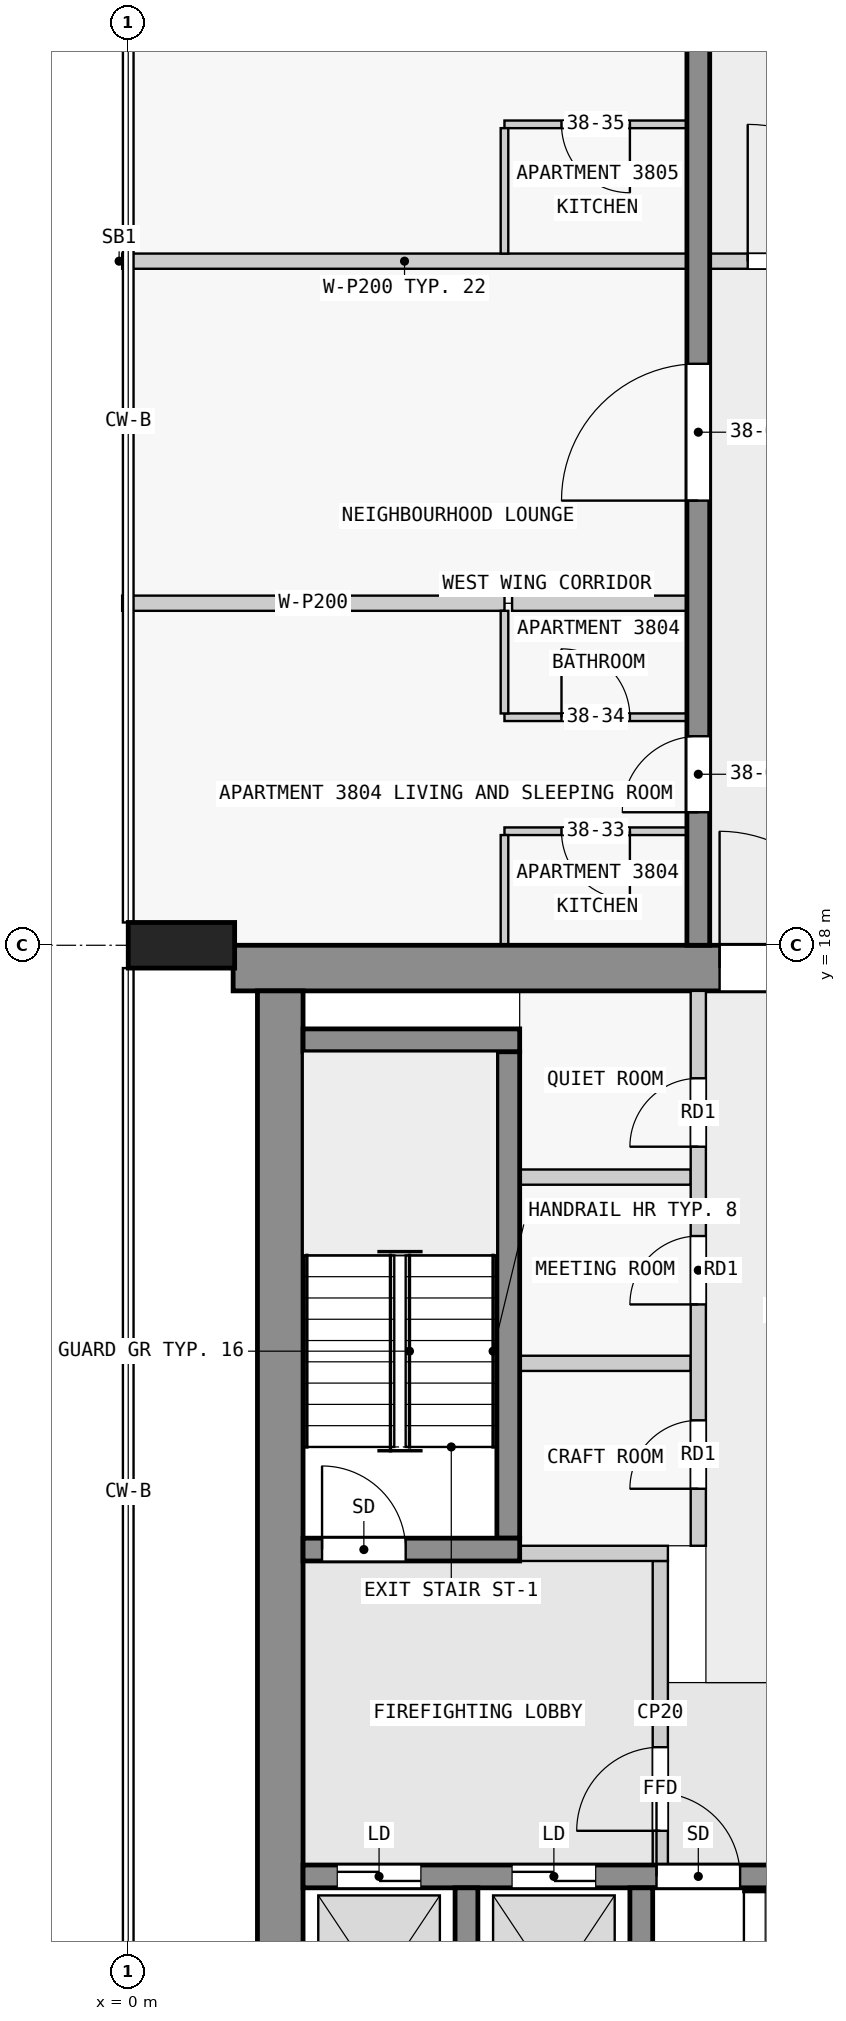
"""IFC4 building model, lengths in metres.
Left out: names, types, materials, properties, quantities, classifications, styles, units other than length and angle.
Written with IfcOpenShell. Run it as: python <this file> out.ifc"""

import sys

from ifc_helpers import new_model, si_unit, direction, frame, frame_2d, origin, origin_2d, place, context, subcontext, project, spatial, rectangle, extrude, element, fill, save


model = new_model("IFC4")
c1 = context("Model", 3, precision=1e-05, world=origin(), true_north=direction((0.0, 1.0)))
c2 = subcontext(c1, "Body", "Model", "MODEL_VIEW")
j1 = project(units=[si_unit("LENGTHUNIT", "METRE"), si_unit("PLANEANGLEUNIT", "RADIAN")], contexts=[c1])
p1 = place(None, origin())
s1 = spatial("IfcSite", under=j1, at=p1, CompositionType="ELEMENT")
p2 = place(p1, origin())
s2 = spatial("IfcBuilding", under=s1, at=p2, CompositionType="ELEMENT")
p3 = place(p2, frame((0.0, 0.0, 149.9)))
s3 = spatial("IfcBuildingStorey", under=s2, at=p3, CompositionType="ELEMENT", Elevation=149.9)
p4 = place(p3, frame((0.7, 18.0, 0.0), z_axis=(0.0, 0.0, 1.0), x_axis=(0.0, 1.0, 0.0)))
e1 = element("IfcColumn", 1, at=p4, inside=s3, PredefinedType="COLUMN", context=c2, shape_type="SweptSolid", body=[
    extrude(rectangle(XDim=0.6, YDim=1.4, at=origin_2d()), origin(), (0.0, 0.0, 1.0), 3.5),
])
p5 = place(p3, frame((1.38, 17.7, 0.0), z_axis=(0.0, 0.0, 1.0), x_axis=(1.0, 0.0, 0.0)))
e2 = element("IfcWall", 2, at=p5, inside=s3, PredefinedType="SHEAR", context=c2, shape_type="SweptSolid", body=[
    extrude(rectangle(XDim=21.12, YDim=0.6, at=frame_2d((10.56, 0.0))), origin(), (0.0, 0.0, 1.0), 3.25),
])
p6 = place(p5, frame((6.4, 0.0, 0.0)))
e3 = element("IfcOpeningElement", 3, at=p6, cuts=e2, PredefinedType="OPENING", context=c2, shape_type="SweptSolid", body=[
    extrude(rectangle(XDim=1.8, YDim=2.1, at=frame_2d((0.9, 1.05))), frame((0.0, 0.31, 0.0), z_axis=(0.0, -1.0, 0.0), x_axis=(1.0, 0.0, 0.0)), (0.0, 0.0, 1.0), 0.62),
])
p7 = place(p3, frame((2.0, 2.5, 0.0), z_axis=(0.0, 0.0, 1.0), x_axis=(0.0, 1.0, 0.0)))
e4 = element("IfcWall", 4, at=p7, inside=s3, PredefinedType="SHEAR", context=c2, shape_type="SweptSolid", body=[
    extrude(rectangle(XDim=14.9, YDim=0.6, at=frame_2d((7.45, 0.0))), origin(), (0.0, 0.0, 1.0), 3.25),
])
for number, where, z_axis, x_axis in (
    (5, (4.45, 2.8, 0.0), (0.0, 0.0, 1.0), (0.0, 1.0, 0.0)),
    (6, (6.75, 2.8, 0.0), (0.0, 0.0, 1.0), (0.0, 1.0, 0.0)),
):
    element("IfcWall", number, at=place(p3, frame(where, z_axis=z_axis, x_axis=x_axis)), inside=s3, PredefinedType="SHEAR", context=c2, shape_type="SweptSolid", body=[
        extrude(rectangle(XDim=2.8, YDim=0.3, at=frame_2d((1.4, 0.0))), origin(), (0.0, 0.0, 1.0), 3.25),
    ])
p8 = place(p3, frame((2.3, 5.75, 0.0), z_axis=(0.0, 0.0, 1.0), x_axis=(1.0, 0.0, 0.0)))
e7 = element("IfcWall", 7, at=p8, inside=s3, PredefinedType="SHEAR", context=c2, shape_type="SweptSolid", body=[
    extrude(rectangle(XDim=18.8, YDim=0.3, at=frame_2d((9.4, 0.0))), origin(), (0.0, 0.0, 1.0), 3.25),
])
p9 = place(p8, frame((4.65, 0.0, 0.0)))
e8 = element("IfcOpeningElement", 8, at=p9, cuts=e7, PredefinedType="OPENING", context=c2, shape_type="SweptSolid", body=[
    extrude(rectangle(XDim=1.1, YDim=2.1, at=frame_2d((0.55, 1.05))), frame((0.0, 0.16, 0.0), z_axis=(0.0, -1.0, 0.0), x_axis=(1.0, 0.0, 0.0)), (0.0, 0.0, 1.0), 0.32),
])
p10 = place(p8, frame((0.45, 0.0, 0.0)))
e9 = element("IfcOpeningElement", 9, at=p10, cuts=e7, PredefinedType="OPENING", context=c2, shape_type="SweptSolid", body=[
    extrude(rectangle(XDim=1.1, YDim=2.1, at=frame_2d((0.55, 1.05))), frame((0.0, 0.16, 0.0), z_axis=(0.0, -1.0, 0.0), x_axis=(1.0, 0.0, 0.0)), (0.0, 0.0, 1.0), 0.32),
])
p11 = place(p8, frame((2.75, 0.0, 0.0)))
e10 = element("IfcOpeningElement", 10, at=p11, cuts=e7, PredefinedType="OPENING", context=c2, shape_type="SweptSolid", body=[
    extrude(rectangle(XDim=1.1, YDim=2.1, at=frame_2d((0.55, 1.05))), frame((0.0, 0.16, 0.0), z_axis=(0.0, -1.0, 0.0), x_axis=(1.0, 0.0, 0.0)), (0.0, 0.0, 1.0), 0.32),
])
p12 = place(p8, frame((14.45, 0.0, 0.0)))
e11 = element("IfcOpeningElement", 11, at=p12, cuts=e7, PredefinedType="OPENING", context=c2, shape_type="SweptSolid", body=[
    extrude(rectangle(XDim=0.9, YDim=2.1, at=frame_2d((0.45, 1.05))), frame((0.0, 0.16, 0.0), z_axis=(0.0, -1.0, 0.0), x_axis=(1.0, 0.0, 0.0)), (0.0, 0.0, 1.0), 0.32),
])
p13 = place(p3, frame((2.3, 10.05, 0.0), z_axis=(0.0, 0.0, 1.0), x_axis=(1.0, 0.0, 0.0)))
e12 = element("IfcWall", 12, at=p13, inside=s3, PredefinedType="SHEAR", context=c2, shape_type="SweptSolid", body=[
    extrude(rectangle(XDim=2.85, YDim=0.3, at=frame_2d((1.425, 0.0))), origin(), (0.0, 0.0, 1.0), 3.25),
])
p14 = place(p13, frame((0.25, 0.0, 0.0)))
e13 = element("IfcOpeningElement", 13, at=p14, cuts=e12, PredefinedType="OPENING", context=c2, shape_type="SweptSolid", body=[
    extrude(rectangle(XDim=1.1, YDim=2.1, at=frame_2d((0.55, 1.05))), frame((0.0, 0.16, 0.0), z_axis=(0.0, -1.0, 0.0), x_axis=(1.0, 0.0, 0.0)), (0.0, 0.0, 1.0), 0.32),
])
p15 = place(p3, frame((5.0, 10.2, 0.0), z_axis=(0.0, 0.0, 1.0), x_axis=(0.0, 1.0, 0.0)))
e14 = element("IfcWall", 14, at=p15, inside=s3, PredefinedType="SHEAR", context=c2, shape_type="SweptSolid", body=[
    extrude(rectangle(XDim=6.4, YDim=0.3, at=frame_2d((3.2, 0.0))), origin(), (0.0, 0.0, 1.0), 3.25),
])
p16 = place(p3, frame((2.3, 16.75, 0.0), z_axis=(0.0, 0.0, 1.0), x_axis=(1.0, 0.0, 0.0)))
e15 = element("IfcWall", 15, at=p16, inside=s3, PredefinedType="SHEAR", context=c2, shape_type="SweptSolid", body=[
    extrude(rectangle(XDim=2.85, YDim=0.3, at=frame_2d((1.425, 0.0))), origin(), (0.0, 0.0, 1.0), 3.25),
])
p17 = place(p3, frame((7.5, 18.0, 0.0), z_axis=(0.0, 0.0, 1.0), x_axis=(0.0, 1.0, 0.0)))
e16 = element("IfcWall", 16, at=p17, inside=s3, PredefinedType="SHEAR", context=c2, shape_type="SweptSolid", body=[
    extrude(rectangle(XDim=27.0, YDim=0.3, at=frame_2d((13.5, 0.0))), origin(), (0.0, 0.0, 1.0), 3.25),
])
p18 = place(p17, frame((1.75, 0.0, 0.0)))
e17 = element("IfcOpeningElement", 17, at=p18, cuts=e16, PredefinedType="OPENING", context=c2, shape_type="SweptSolid", body=[
    extrude(rectangle(XDim=1.0, YDim=2.1, at=frame_2d((0.5, 1.05))), frame((0.0, 0.16, 0.0), z_axis=(0.0, -1.0, 0.0), x_axis=(1.0, 0.0, 0.0)), (0.0, 0.0, 1.0), 0.32),
])
p19 = place(p17, frame((5.85, 0.0, 0.0)))
e18 = element("IfcOpeningElement", 18, at=p19, cuts=e16, PredefinedType="OPENING", context=c2, shape_type="SweptSolid", body=[
    extrude(rectangle(XDim=1.8, YDim=2.1, at=frame_2d((0.9, 1.05))), frame((0.0, 0.16, 0.0), z_axis=(0.0, -1.0, 0.0), x_axis=(1.0, 0.0, 0.0)), (0.0, 0.0, 1.0), 0.32),
])
p20 = place(p17, frame((13.05, 0.0, 0.0)))
e19 = element("IfcOpeningElement", 19, at=p20, cuts=e16, PredefinedType="OPENING", context=c2, shape_type="SweptSolid", body=[
    extrude(rectangle(XDim=1.0, YDim=2.1, at=frame_2d((0.5, 1.05))), frame((0.0, 0.16, 0.0), z_axis=(0.0, -1.0, 0.0), x_axis=(1.0, 0.0, 0.0)), (0.0, 0.0, 1.0), 0.32),
])
p21 = place(p17, frame((21.35, 0.0, 0.0)))
e20 = element("IfcOpeningElement", 20, at=p21, cuts=e16, PredefinedType="OPENING", context=c2, shape_type="SweptSolid", body=[
    extrude(rectangle(XDim=1.0, YDim=2.1, at=frame_2d((0.5, 1.05))), frame((0.0, 0.16, 0.0), z_axis=(0.0, -1.0, 0.0), x_axis=(1.0, 0.0, 0.0)), (0.0, 0.0, 1.0), 0.32),
])
p22 = place(p3, frame((7.0, 5.9, 0.0), z_axis=(0.0, 0.0, 1.0), x_axis=(0.0, 1.0, 0.0)))
e21 = element("IfcWall", 21, at=p22, inside=s3, PredefinedType="PARTITIONING", context=c2, shape_type="SweptSolid", body=[
    extrude(rectangle(XDim=4.0, YDim=0.2, at=frame_2d((2.0, 0.0))), origin(), (0.0, 0.0, 1.0), 3.25),
])
p23 = place(p22, frame((0.45, 0.0, 0.0)))
e22 = element("IfcOpeningElement", 22, at=p23, cuts=e21, PredefinedType="OPENING", context=c2, shape_type="SweptSolid", body=[
    extrude(rectangle(XDim=1.1, YDim=2.1, at=frame_2d((0.55, 1.05))), frame((0.0, 0.11, 0.0), z_axis=(0.0, -1.0, 0.0), x_axis=(1.0, 0.0, 0.0)), (0.0, 0.0, 1.0), 0.22),
])
p24 = place(p3, frame((5.15, 10.0, 0.0), z_axis=(0.0, 0.0, 1.0), x_axis=(1.0, 0.0, 0.0)))
e23 = element("IfcWall", 23, at=p24, inside=s3, PredefinedType="PARTITIONING", context=c2, shape_type="SweptSolid", body=[
    extrude(rectangle(XDim=1.95, YDim=0.2, at=frame_2d((0.975, 0.0))), origin(), (0.0, 0.0, 1.0), 3.25),
])
p25 = place(p3, frame((7.5, 10.1, 0.0), z_axis=(0.0, 0.0, 1.0), x_axis=(0.0, 1.0, 0.0)))
e24 = element("IfcWall", 24, at=p25, inside=s3, PredefinedType="PARTITIONING", context=c2, shape_type="SweptSolid", body=[
    extrude(rectangle(XDim=7.3, YDim=0.2, at=frame_2d((3.65, 0.0))), origin(), (0.0, 0.0, 1.0), 3.25),
])
p26 = place(p25, frame((0.75, 0.0, 0.0)))
e25 = element("IfcOpeningElement", 25, at=p26, cuts=e24, PredefinedType="OPENING", context=c2, shape_type="SweptSolid", body=[
    extrude(rectangle(XDim=0.9, YDim=2.1, at=frame_2d((0.45, 1.05))), frame((0.0, 0.11, 0.0), z_axis=(0.0, -1.0, 0.0), x_axis=(1.0, 0.0, 0.0)), (0.0, 0.0, 1.0), 0.22),
])
p27 = place(p25, frame((3.175, 0.0, 0.0)))
e26 = element("IfcOpeningElement", 26, at=p27, cuts=e24, PredefinedType="OPENING", context=c2, shape_type="SweptSolid", body=[
    extrude(rectangle(XDim=0.9, YDim=2.1, at=frame_2d((0.45, 1.05))), frame((0.0, 0.11, 0.0), z_axis=(0.0, -1.0, 0.0), x_axis=(1.0, 0.0, 0.0)), (0.0, 0.0, 1.0), 0.22),
])
p28 = place(p25, frame((5.25, 0.0, 0.0)))
e27 = element("IfcOpeningElement", 27, at=p28, cuts=e24, PredefinedType="OPENING", context=c2, shape_type="SweptSolid", body=[
    extrude(rectangle(XDim=0.9, YDim=2.1, at=frame_2d((0.45, 1.05))), frame((0.0, 0.11, 0.0), z_axis=(0.0, -1.0, 0.0), x_axis=(1.0, 0.0, 0.0)), (0.0, 0.0, 1.0), 0.22),
])
for number, where, z_axis, x_axis in (
    (28, (5.15, 12.5, 0.0), (0.0, 0.0, 1.0), (1.0, 0.0, 0.0)),
    (29, (5.15, 14.95, 0.0), (0.0, 0.0, 1.0), (1.0, 0.0, 0.0)),
):
    element("IfcWall", number, at=place(p3, frame(where, z_axis=z_axis, x_axis=x_axis)), inside=s3, PredefinedType="PARTITIONING", context=c2, shape_type="SweptSolid", body=[
        extrude(rectangle(XDim=2.25, YDim=0.2, at=frame_2d((1.125, 0.0))), origin(), (0.0, 0.0, 1.0), 3.25),
    ])
p29 = place(p3, frame((7.35, 19.5, 0.0), z_axis=(0.0, 0.0, 1.0), x_axis=(-1.0, 0.0, 0.0)))
e30 = element("IfcWall", 30, at=p29, inside=s3, PredefinedType="PARTITIONING", context=c2, shape_type="SweptSolid", body=[
    extrude(rectangle(XDim=2.4, YDim=0.1, at=frame_2d((1.2, 0.0))), origin(), (0.0, 0.0, 1.0), 3.25),
])
p30 = place(p29, frame((0.75, 0.0, 0.0)))
e31 = element("IfcOpeningElement", 31, at=p30, cuts=e30, PredefinedType="OPENING", context=c2, shape_type="SweptSolid", body=[
    extrude(rectangle(XDim=0.9, YDim=2.1, at=frame_2d((0.45, 1.05))), frame((0.0, 0.06, 0.0), z_axis=(0.0, -1.0, 0.0), x_axis=(1.0, 0.0, 0.0)), (0.0, 0.0, 1.0), 0.12),
])
p31 = place(p3, frame((4.95, 21.0, 0.0), z_axis=(0.0, 0.0, 1.0), x_axis=(1.0, 0.0, 0.0)))
e32 = element("IfcWall", 32, at=p31, inside=s3, PredefinedType="PARTITIONING", context=c2, shape_type="SweptSolid", body=[
    extrude(rectangle(XDim=2.4, YDim=0.1, at=frame_2d((1.2, 0.0))), origin(), (0.0, 0.0, 1.0), 3.25),
])
p32 = place(p31, frame((0.75, 0.0, 0.0)))
e33 = element("IfcOpeningElement", 33, at=p32, cuts=e32, PredefinedType="OPENING", context=c2, shape_type="SweptSolid", body=[
    extrude(rectangle(XDim=0.9, YDim=2.1, at=frame_2d((0.45, 1.05))), frame((0.0, 0.06, 0.0), z_axis=(0.0, -1.0, 0.0), x_axis=(1.0, 0.0, 0.0)), (0.0, 0.0, 1.0), 0.12),
])
p33 = place(p3, frame((7.35, 22.5, 0.0), z_axis=(0.0, 0.0, 1.0), x_axis=(-1.0, 0.0, 0.0)))
e34 = element("IfcWall", 34, at=p33, inside=s3, PredefinedType="PARTITIONING", context=c2, shape_type="SweptSolid", body=[
    extrude(rectangle(XDim=2.3, YDim=0.2, at=frame_2d((1.15, 0.0))), origin(), (0.0, 0.0, 1.0), 3.25),
])
p34 = place(p3, frame((-0.08, 22.5, 0.0), z_axis=(0.0, 0.0, 1.0), x_axis=(1.0, 0.0, 0.0)))
e35 = element("IfcWall", 35, at=p34, inside=s3, PredefinedType="PARTITIONING", context=c2, shape_type="SweptSolid", body=[
    extrude(rectangle(XDim=5.03, YDim=0.2, at=frame_2d((2.515, 0.0))), origin(), (0.0, 0.0, 1.0), 3.25),
])
p35 = place(p3, frame((7.35, 27.0, 0.0), z_axis=(0.0, 0.0, 1.0), x_axis=(-1.0, 0.0, 0.0)))
e36 = element("IfcWall", 36, at=p35, inside=s3, PredefinedType="PARTITIONING", context=c2, shape_type="SweptSolid", body=[
    extrude(rectangle(XDim=7.43, YDim=0.2, at=frame_2d((3.715, 0.0))), origin(), (0.0, 0.0, 1.0), 3.25),
])
p36 = place(p3, frame((7.35, 28.8, 0.0), z_axis=(0.0, 0.0, 1.0), x_axis=(-1.0, 0.0, 0.0)))
e37 = element("IfcWall", 37, at=p36, inside=s3, PredefinedType="PARTITIONING", context=c2, shape_type="SweptSolid", body=[
    extrude(rectangle(XDim=2.4, YDim=0.1, at=frame_2d((1.2, 0.0))), origin(), (0.0, 0.0, 1.0), 3.25),
])
p37 = place(p36, frame((0.75, 0.0, 0.0)))
e38 = element("IfcOpeningElement", 38, at=p37, cuts=e37, PredefinedType="OPENING", context=c2, shape_type="SweptSolid", body=[
    extrude(rectangle(XDim=0.9, YDim=2.1, at=frame_2d((0.45, 1.05))), frame((0.0, 0.06, 0.0), z_axis=(0.0, -1.0, 0.0), x_axis=(1.0, 0.0, 0.0)), (0.0, 0.0, 1.0), 0.12),
])
p38 = place(p3, frame((4.95, 19.45, 0.0), z_axis=(0.0, 0.0, 1.0), x_axis=(0.0, -1.0, 0.0)))
e39 = element("IfcWall", 39, at=p38, inside=s3, PredefinedType="PARTITIONING", context=c2, shape_type="SweptSolid", body=[
    extrude(rectangle(XDim=1.45, YDim=0.1, at=frame_2d((0.725, 0.0))), origin(), (0.0, 0.0, 1.0), 3.25),
])
p39 = place(p3, frame((4.95, 22.4, 0.0), z_axis=(0.0, 0.0, 1.0), x_axis=(0.0, -1.0, 0.0)))
e40 = element("IfcWall", 40, at=p39, inside=s3, PredefinedType="PARTITIONING", context=c2, shape_type="SweptSolid", body=[
    extrude(rectangle(XDim=1.35, YDim=0.1, at=frame_2d((0.675, 0.0))), origin(), (0.0, 0.0, 1.0), 3.25),
])
p40 = place(p3, frame((4.95, 28.75, 0.0), z_axis=(0.0, 0.0, 1.0), x_axis=(0.0, -1.0, 0.0)))
e41 = element("IfcWall", 41, at=p40, inside=s3, PredefinedType="PARTITIONING", context=c2, shape_type="SweptSolid", body=[
    extrude(rectangle(XDim=1.65, YDim=0.1, at=frame_2d((0.825, 0.0))), origin(), (0.0, 0.0, 1.0), 3.25),
])
p41 = place(p3, frame((7.45, 27.0, 0.0), z_axis=(0.0, 0.0, 1.0), x_axis=(1.0, 0.0, 0.0)))
e42 = element("IfcWall", 42, at=p41, inside=s3, PredefinedType="PARTITIONING", context=c2, shape_type="SweptSolid", body=[
    extrude(rectangle(XDim=3.2, YDim=0.2, at=frame_2d((1.6, 0.0))), origin(), (0.0, 0.0, 1.0), 3.25),
])
p42 = place(p41, frame((0.7, 0.0, 0.0)))
e43 = element("IfcOpeningElement", 43, at=p42, cuts=e42, PredefinedType="OPENING", context=c2, shape_type="SweptSolid", body=[
    extrude(rectangle(XDim=1.8, YDim=2.1, at=frame_2d((0.9, 1.05))), frame((0.0, 0.11, 0.0), z_axis=(0.0, -1.0, 0.0), x_axis=(1.0, 0.0, 0.0)), (0.0, 0.0, 1.0), 0.22),
])
p43 = place(p23, origin())
e44 = element("IfcDoor", 44, at=p43, inside=s3, OperationType="SINGLE_SWING_LEFT", PredefinedType="DOOR", context=c2, shape_type="SweptSolid", body=[
    extrude(rectangle(XDim=1.1, YDim=2.1, at=frame_2d((0.55, 1.05))), frame((0.0, 0.025, 0.0), z_axis=(0.0, -1.0, 0.0), x_axis=(1.0, 0.0, 0.0)), (0.0, 0.0, 1.0), 0.05),
])
fill(e22, e44)
p44 = place(p14, origin())
e45 = element("IfcDoor", 45, at=p44, inside=s3, OperationType="SINGLE_SWING_RIGHT", PredefinedType="DOOR", context=c2, shape_type="SweptSolid", body=[
    extrude(rectangle(XDim=1.1, YDim=2.1, at=frame_2d((0.55, 1.05))), frame((0.0, 0.025, 0.0), z_axis=(0.0, -1.0, 0.0), x_axis=(1.0, 0.0, 0.0)), (0.0, 0.0, 1.0), 0.05),
])
fill(e13, e45)
p45 = place(p9, origin())
e46 = element("IfcDoor", 46, at=p45, inside=s3, OperationType="SINGLE_SWING_LEFT", PredefinedType="DOOR", context=c2, shape_type="SweptSolid", body=[
    extrude(rectangle(XDim=1.1, YDim=2.1, at=frame_2d((0.55, 1.05))), frame((0.0, 0.025, 0.0), z_axis=(0.0, -1.0, 0.0), x_axis=(1.0, 0.0, 0.0)), (0.0, 0.0, 1.0), 0.05),
])
fill(e8, e46)
p46 = place(p10, origin())
e47 = element("IfcDoor", 47, at=p46, inside=s3, OperationType="DOUBLE_DOOR_SLIDING", PredefinedType="DOOR", context=c2, shape_type="SweptSolid", body=[
    extrude(rectangle(XDim=1.1, YDim=2.1, at=frame_2d((0.55, 1.05))), frame((0.0, 0.025, 0.0), z_axis=(0.0, -1.0, 0.0), x_axis=(1.0, 0.0, 0.0)), (0.0, 0.0, 1.0), 0.05),
])
fill(e9, e47)
p47 = place(p11, origin())
e48 = element("IfcDoor", 48, at=p47, inside=s3, OperationType="DOUBLE_DOOR_SLIDING", PredefinedType="DOOR", context=c2, shape_type="SweptSolid", body=[
    extrude(rectangle(XDim=1.1, YDim=2.1, at=frame_2d((0.55, 1.05))), frame((0.0, 0.025, 0.0), z_axis=(0.0, -1.0, 0.0), x_axis=(1.0, 0.0, 0.0)), (0.0, 0.0, 1.0), 0.05),
])
fill(e10, e48)
p48 = place(p6, origin())
e49 = element("IfcDoor", 49, at=p48, inside=s3, OperationType="DOUBLE_DOOR_SINGLE_SWING", PredefinedType="DOOR", context=c2, shape_type="SweptSolid", body=[
    extrude(rectangle(XDim=1.8, YDim=2.1, at=frame_2d((0.9, 1.05))), frame((0.0, 0.025, 0.0), z_axis=(0.0, -1.0, 0.0), x_axis=(1.0, 0.0, 0.0)), (0.0, 0.0, 1.0), 0.05),
])
fill(e3, e49)
p49 = place(p26, origin())
e50 = element("IfcDoor", 50, at=p49, inside=s3, OperationType="SINGLE_SWING_RIGHT", PredefinedType="DOOR", context=c2, shape_type="SweptSolid", body=[
    extrude(rectangle(XDim=0.9, YDim=2.1, at=frame_2d((0.45, 1.05))), frame((0.0, 0.025, 0.0), z_axis=(0.0, -1.0, 0.0), x_axis=(1.0, 0.0, 0.0)), (0.0, 0.0, 1.0), 0.05),
])
fill(e25, e50)
p50 = place(p27, origin())
e51 = element("IfcDoor", 51, at=p50, inside=s3, OperationType="SINGLE_SWING_RIGHT", PredefinedType="DOOR", context=c2, shape_type="SweptSolid", body=[
    extrude(rectangle(XDim=0.9, YDim=2.1, at=frame_2d((0.45, 1.05))), frame((0.0, 0.025, 0.0), z_axis=(0.0, -1.0, 0.0), x_axis=(1.0, 0.0, 0.0)), (0.0, 0.0, 1.0), 0.05),
])
fill(e26, e51)
p51 = place(p28, origin())
e52 = element("IfcDoor", 52, at=p51, inside=s3, OperationType="SINGLE_SWING_RIGHT", PredefinedType="DOOR", context=c2, shape_type="SweptSolid", body=[
    extrude(rectangle(XDim=0.9, YDim=2.1, at=frame_2d((0.45, 1.05))), frame((0.0, 0.025, 0.0), z_axis=(0.0, -1.0, 0.0), x_axis=(1.0, 0.0, 0.0)), (0.0, 0.0, 1.0), 0.05),
])
fill(e27, e52)
p52 = place(p18, origin())
e53 = element("IfcDoor", 53, at=p52, inside=s3, OperationType="SINGLE_SWING_LEFT", PredefinedType="DOOR", context=c2, shape_type="SweptSolid", body=[
    extrude(rectangle(XDim=1.0, YDim=2.1, at=frame_2d((0.5, 1.05))), frame((0.0, 0.025, 0.0), z_axis=(0.0, -1.0, 0.0), x_axis=(1.0, 0.0, 0.0)), (0.0, 0.0, 1.0), 0.05),
])
fill(e17, e53)
p53 = place(p19, origin())
e54 = element("IfcDoor", 54, at=p53, inside=s3, OperationType="SINGLE_SWING_LEFT", PredefinedType="DOOR", context=c2, shape_type="SweptSolid", body=[
    extrude(rectangle(XDim=1.8, YDim=2.1, at=frame_2d((0.9, 1.05))), frame((0.0, 0.025, 0.0), z_axis=(0.0, -1.0, 0.0), x_axis=(1.0, 0.0, 0.0)), (0.0, 0.0, 1.0), 0.05),
])
fill(e18, e54)
p54 = place(p42, origin())
e55 = element("IfcDoor", 55, at=p54, inside=s3, OperationType="SINGLE_SWING_LEFT", PredefinedType="DOOR", context=c2, shape_type="SweptSolid", body=[
    extrude(rectangle(XDim=1.8, YDim=2.1, at=frame_2d((0.9, 1.05))), frame((0.0, 0.025, 0.0), z_axis=(0.0, -1.0, 0.0), x_axis=(1.0, 0.0, 0.0)), (0.0, 0.0, 1.0), 0.05),
])
fill(e43, e55)
p55 = place(p30, origin())
e56 = element("IfcDoor", 56, at=p55, inside=s3, OperationType="SINGLE_SWING_RIGHT", PredefinedType="DOOR", context=c2, shape_type="SweptSolid", body=[
    extrude(rectangle(XDim=0.9, YDim=2.1, at=frame_2d((0.45, 1.05))), frame((0.0, 0.025, 0.0), z_axis=(0.0, -1.0, 0.0), x_axis=(1.0, 0.0, 0.0)), (0.0, 0.0, 1.0), 0.05),
])
fill(e31, e56)
p56 = place(p32, origin())
e57 = element("IfcDoor", 57, at=p56, inside=s3, OperationType="SINGLE_SWING_RIGHT", PredefinedType="DOOR", context=c2, shape_type="SweptSolid", body=[
    extrude(rectangle(XDim=0.9, YDim=2.1, at=frame_2d((0.45, 1.05))), frame((0.0, 0.025, 0.0), z_axis=(0.0, -1.0, 0.0), x_axis=(1.0, 0.0, 0.0)), (0.0, 0.0, 1.0), 0.05),
])
fill(e33, e57)
p57 = place(p37, origin())
e58 = element("IfcDoor", 58, at=p57, inside=s3, OperationType="SINGLE_SWING_RIGHT", PredefinedType="DOOR", context=c2, shape_type="SweptSolid", body=[
    extrude(rectangle(XDim=0.9, YDim=2.1, at=frame_2d((0.45, 1.05))), frame((0.0, 0.025, 0.0), z_axis=(0.0, -1.0, 0.0), x_axis=(1.0, 0.0, 0.0)), (0.0, 0.0, 1.0), 0.05),
])
fill(e38, e58)
save(model, sys.argv[1])
